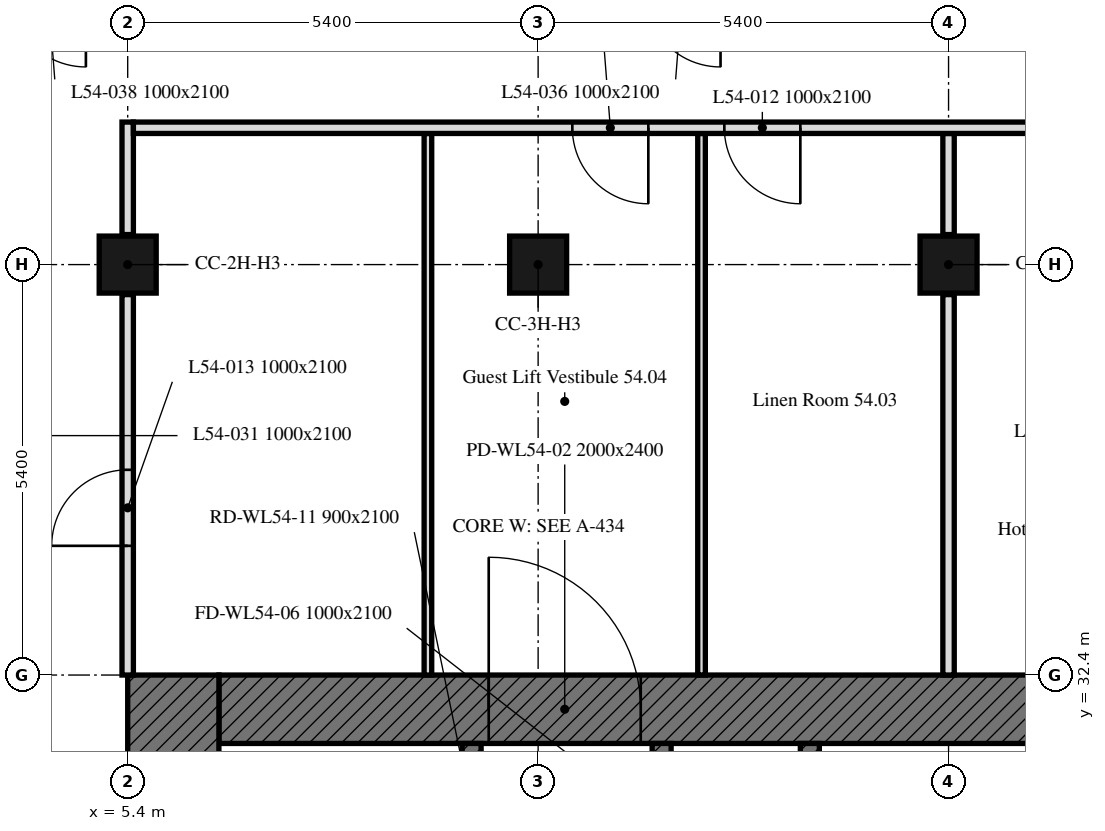
"""IFC4 building model, lengths in metres.
Left out: names, types, materials, properties, quantities, classifications, styles, units other than length and angle.
Written with IfcOpenShell. Run it as: python <this file> out.ifc"""

import sys

from ifc_helpers import new_model, si_unit, direction, frame, frame_2d, origin, origin_2d, place, context, subcontext, project, spatial, rectangle, extrude, element, fill, save


model = new_model("IFC4")
c1 = context("Model", 3, precision=1e-05, world=origin(), true_north=direction((0.0, 1.0)))
c2 = subcontext(c1, "Body", "Model", "MODEL_VIEW")
j1 = project(units=[si_unit("LENGTHUNIT", "METRE"), si_unit("PLANEANGLEUNIT", "RADIAN")], contexts=[c1])
p1 = place(None, origin())
s1 = spatial("IfcSite", under=j1, at=p1, CompositionType="ELEMENT")
p2 = place(p1, origin())
s2 = spatial("IfcBuilding", under=s1, at=p2, CompositionType="ELEMENT")
p3 = place(p2, frame((0.0, 0.0, 217.0)))
s3 = spatial("IfcBuildingStorey", under=s2, at=p3, CompositionType="ELEMENT", Elevation=217.0)
for number, where, z_axis, x_axis in (
    (1, (5.4, 37.8, 0.0), (0.0, 0.0, 1.0), (1.0, 0.0, 0.0)),
    (2, (10.8, 37.8, 0.0), (0.0, 0.0, 1.0), (1.0, 0.0, 0.0)),
    (3, (16.2, 37.8, 0.0), (0.0, 0.0, 1.0), (1.0, 0.0, 0.0)),
):
    element("IfcColumn", number, at=place(p3, frame(where, z_axis=z_axis, x_axis=x_axis)), inside=s3, PredefinedType="COLUMN", context=c2, shape_type="SweptSolid", body=[
        extrude(rectangle(XDim=0.75, YDim=0.75, at=origin_2d()), origin(), (0.0, 0.0, 1.0), 3.0),
    ])
p4 = place(p3, frame((6.6, 31.95, 0.0), z_axis=(0.0, 0.0, 1.0), x_axis=(1.0, 0.0, 0.0)))
e4 = element("IfcWall", 4, at=p4, inside=s3, PredefinedType="SOLIDWALL", context=c2, shape_type="SweptSolid", body=[
    extrude(rectangle(XDim=11.1, YDim=0.9, at=frame_2d((5.55, 0.0))), origin(), (0.0, 0.0, 1.0), 3.0),
])
p5 = place(p4, frame((3.55, 0.0, 0.0)))
e5 = element("IfcOpeningElement", 5, at=p5, cuts=e4, PredefinedType="OPENING", context=c2, shape_type="SweptSolid", body=[
    extrude(rectangle(XDim=2.0, YDim=2.4, at=frame_2d((1.0, 1.2))), frame((0.0, 0.45, 0.0), z_axis=(0.0, -1.0, 0.0), x_axis=(1.0, 0.0, 0.0)), (0.0, 0.0, 1.0), 0.9),
])
p6 = place(p3, frame((6.0, 16.2, 0.0), z_axis=(0.0, 0.0, 1.0), x_axis=(0.0, 1.0, 0.0)))
e6 = element("IfcWall", 6, at=p6, inside=s3, PredefinedType="SOLIDWALL", context=c2, shape_type="SweptSolid", body=[
    extrude(rectangle(XDim=16.2, YDim=1.2, at=frame_2d((8.1, 0.0))), origin(), (0.0, 0.0, 1.0), 3.0),
])
p7 = place(p3, frame((9.925, 17.1, 0.0), z_axis=(0.0, 0.0, 1.0), x_axis=(0.0, 1.0, 0.0)))
e7 = element("IfcWall", 7, at=p7, inside=s3, PredefinedType="SOLIDWALL", context=c2, shape_type="SweptSolid", body=[
    extrude(rectangle(XDim=14.4, YDim=0.25, at=frame_2d((7.2, 0.0))), origin(), (0.0, 0.0, 1.0), 3.0),
])
p8 = place(p7, frame((4.6, 0.0, 0.0)))
e8 = element("IfcOpeningElement", 8, at=p8, cuts=e7, PredefinedType="OPENING", context=c2, shape_type="SweptSolid", body=[
    extrude(rectangle(XDim=1.0, YDim=2.1, at=frame_2d((0.5, 1.05))), frame((0.0, 0.125, 0.0), z_axis=(0.0, -1.0, 0.0), x_axis=(1.0, 0.0, 0.0)), (0.0, 0.0, 1.0), 0.25),
])
p9 = place(p7, frame((7.062, 0.0, 0.0)))
e9 = element("IfcOpeningElement", 9, at=p9, cuts=e7, PredefinedType="OPENING", context=c2, shape_type="SweptSolid", body=[
    extrude(rectangle(XDim=1.2, YDim=2.1, at=frame_2d((0.6, 1.05))), frame((0.0, 0.125, 0.0), z_axis=(0.0, -1.0, 0.0), x_axis=(1.0, 0.0, 0.0)), (0.0, 0.0, 1.0), 0.25),
])
p10 = place(p7, frame((9.472, 0.0, 0.0)))
e10 = element("IfcOpeningElement", 10, at=p10, cuts=e7, PredefinedType="OPENING", context=c2, shape_type="SweptSolid", body=[
    extrude(rectangle(XDim=0.9, YDim=2.1, at=frame_2d((0.45, 1.05))), frame((0.0, 0.125, 0.0), z_axis=(0.0, -1.0, 0.0), x_axis=(1.0, 0.0, 0.0)), (0.0, 0.0, 1.0), 0.25),
])
p11 = place(p7, frame((11.159, 0.0, 0.0)))
e11 = element("IfcOpeningElement", 11, at=p11, cuts=e7, PredefinedType="OPENING", context=c2, shape_type="SweptSolid", body=[
    extrude(rectangle(XDim=0.9, YDim=2.1, at=frame_2d((0.45, 1.05))), frame((0.0, 0.125, 0.0), z_axis=(0.0, -1.0, 0.0), x_axis=(1.0, 0.0, 0.0)), (0.0, 0.0, 1.0), 0.25),
])
p12 = place(p7, frame((13.1, 0.0, 0.0)))
e12 = element("IfcOpeningElement", 12, at=p12, cuts=e7, PredefinedType="OPENING", context=c2, shape_type="SweptSolid", body=[
    extrude(rectangle(XDim=0.9, YDim=2.1, at=frame_2d((0.45, 1.05))), frame((0.0, 0.125, 0.0), z_axis=(0.0, -1.0, 0.0), x_axis=(1.0, 0.0, 0.0)), (0.0, 0.0, 1.0), 0.25),
])
p13 = place(p3, frame((14.375, 17.1, 0.0), z_axis=(0.0, 0.0, 1.0), x_axis=(0.0, 1.0, 0.0)))
e13 = element("IfcWall", 13, at=p13, inside=s3, PredefinedType="SOLIDWALL", context=c2, shape_type="SweptSolid", body=[
    extrude(rectangle(XDim=14.4, YDim=0.25, at=frame_2d((7.2, 0.0))), origin(), (0.0, 0.0, 1.0), 3.0),
])
p14 = place(p13, frame((13.15, 0.0, 0.0)))
e14 = element("IfcOpeningElement", 14, at=p14, cuts=e13, PredefinedType="OPENING", context=c2, shape_type="SweptSolid", body=[
    extrude(rectangle(XDim=1.0, YDim=2.1, at=frame_2d((0.5, 1.05))), frame((0.0, 0.125, 0.0), z_axis=(0.0, -1.0, 0.0), x_axis=(1.0, 0.0, 0.0)), (0.0, 0.0, 1.0), 0.25),
])
p15 = place(p13, frame((0.6, 0.0, 0.0)))
e15 = element("IfcOpeningElement", 15, at=p15, cuts=e13, PredefinedType="OPENING", context=c2, shape_type="SweptSolid", body=[
    extrude(rectangle(XDim=1.1, YDim=2.1, at=frame_2d((0.55, 1.05))), frame((0.0, 0.125, 0.0), z_axis=(0.0, -1.0, 0.0), x_axis=(1.0, 0.0, 0.0)), (0.0, 0.0, 1.0), 0.25),
])
p16 = place(p13, frame((3.25, 0.0, 0.0)))
e16 = element("IfcOpeningElement", 16, at=p16, cuts=e13, PredefinedType="OPENING", context=c2, shape_type="SweptSolid", body=[
    extrude(rectangle(XDim=0.9, YDim=2.1, at=frame_2d((0.45, 1.05))), frame((0.0, 0.125, 0.0), z_axis=(0.0, -1.0, 0.0), x_axis=(1.0, 0.0, 0.0)), (0.0, 0.0, 1.0), 0.25),
])
p17 = place(p3, frame((12.425, 29.4, 0.0), z_axis=(0.0, 0.0, 1.0), x_axis=(0.0, 1.0, 0.0)))
e17 = element("IfcWall", 17, at=p17, inside=s3, PredefinedType="SOLIDWALL", context=c2, shape_type="SweptSolid", body=[
    extrude(rectangle(XDim=2.1, YDim=0.25, at=frame_2d((1.05, 0.0))), origin(), (0.0, 0.0, 1.0), 3.0),
])
p18 = place(p17, frame((0.5, 0.0, 0.0)))
e18 = element("IfcOpeningElement", 18, at=p18, cuts=e17, PredefinedType="OPENING", context=c2, shape_type="SweptSolid", body=[
    extrude(rectangle(XDim=1.0, YDim=2.1, at=frame_2d((0.5, 1.05))), frame((0.0, 0.125, 0.0), z_axis=(0.0, -1.0, 0.0), x_axis=(1.0, 0.0, 0.0)), (0.0, 0.0, 1.0), 0.25),
])
p19 = place(p3, frame((16.2, 39.525, 0.0), z_axis=(0.0, 0.0, 1.0), x_axis=(0.0, -1.0, 0.0)))
e19 = element("IfcWall", 19, at=p19, inside=s3, PredefinedType="PARTITIONING", context=c2, shape_type="SweptSolid", body=[
    extrude(rectangle(XDim=1.33, YDim=0.15, at=frame_2d((0.665, 0.0))), origin(), (0.0, 0.0, 1.0), 2.4),
])
p20 = place(p3, frame((16.2, 37.405, 0.0), z_axis=(0.0, 0.0, 1.0), x_axis=(0.0, -1.0, 0.0)))
e20 = element("IfcWall", 20, at=p20, inside=s3, PredefinedType="PARTITIONING", context=c2, shape_type="SweptSolid", body=[
    extrude(rectangle(XDim=5.005, YDim=0.15, at=frame_2d((2.502, 0.0))), origin(), (0.0, 0.0, 1.0), 2.4),
])
for number, where, z_axis, x_axis in (
    (21, (12.95, 32.4, 0.0), (0.0, 0.0, 1.0), (0.0, 1.0, 0.0)),
    (22, (9.35, 39.525, 0.0), (0.0, 0.0, 1.0), (0.0, -1.0, 0.0)),
):
    element("IfcWall", number, at=place(p3, frame(where, z_axis=z_axis, x_axis=x_axis)), inside=s3, PredefinedType="PARTITIONING", context=c2, shape_type="SweptSolid", body=[
        extrude(rectangle(XDim=7.125, YDim=0.1, at=frame_2d((3.562, 0.0))), origin(), (0.0, 0.0, 1.0), 2.4),
    ])
p21 = place(p3, frame((5.4, 32.4, 0.0), z_axis=(0.0, 0.0, 1.0), x_axis=(0.0, 1.0, 0.0)))
e23 = element("IfcWall", 23, at=p21, inside=s3, PredefinedType="PARTITIONING", context=c2, shape_type="SweptSolid", body=[
    extrude(rectangle(XDim=5.005, YDim=0.15, at=frame_2d((2.502, 0.0))), origin(), (0.0, 0.0, 1.0), 3.0),
])
p22 = place(p21, frame((1.7, 0.0, 0.0)))
e24 = element("IfcOpeningElement", 24, at=p22, cuts=e23, PredefinedType="OPENING", context=c2, shape_type="SweptSolid", body=[
    extrude(rectangle(XDim=1.0, YDim=2.1, at=frame_2d((0.5, 1.05))), frame((0.0, 0.075, 0.0), z_axis=(0.0, -1.0, 0.0), x_axis=(1.0, 0.0, 0.0)), (0.0, 0.0, 1.0), 0.15),
])
p23 = place(p3, frame((5.4, 38.195, 0.0), z_axis=(0.0, 0.0, 1.0), x_axis=(0.0, 1.0, 0.0)))
e25 = element("IfcWall", 25, at=p23, inside=s3, PredefinedType="PARTITIONING", context=c2, shape_type="SweptSolid", body=[
    extrude(rectangle(XDim=1.48, YDim=0.15, at=frame_2d((0.74, 0.0))), origin(), (0.0, 0.0, 1.0), 3.0),
])
p24 = place(p3, frame((41.374, 39.6, 0.0), z_axis=(0.0, 0.0, 1.0), x_axis=(-1.0, 0.0, 0.0)))
e26 = element("IfcWall", 26, at=p24, inside=s3, PredefinedType="PARTITIONING", context=c2, shape_type="SweptSolid", body=[
    extrude(rectangle(XDim=35.899, YDim=0.15, at=frame_2d((17.949, 0.0))), origin(), (0.0, 0.0, 1.0), 2.4),
])
p25 = place(p24, frame((0.25, 0.0, 0.0)))
e27 = element("IfcOpeningElement", 27, at=p25, cuts=e26, PredefinedType="OPENING", context=c2, shape_type="SweptSolid", body=[
    extrude(rectangle(XDim=1.0, YDim=2.1, at=frame_2d((0.5, 1.05))), frame((0.0, 0.075, 0.0), z_axis=(0.0, -1.0, 0.0), x_axis=(1.0, 0.0, 0.0)), (0.0, 0.0, 1.0), 0.15),
])
p26 = place(p24, frame((27.124, 0.0, 0.0)))
e28 = element("IfcOpeningElement", 28, at=p26, cuts=e26, PredefinedType="OPENING", context=c2, shape_type="SweptSolid", body=[
    extrude(rectangle(XDim=1.0, YDim=2.1, at=frame_2d((0.5, 1.05))), frame((0.0, 0.075, 0.0), z_axis=(0.0, -1.0, 0.0), x_axis=(1.0, 0.0, 0.0)), (0.0, 0.0, 1.0), 0.15),
])
p27 = place(p24, frame((6.024, 0.0, 0.0)))
e29 = element("IfcOpeningElement", 29, at=p27, cuts=e26, PredefinedType="OPENING", context=c2, shape_type="SweptSolid", body=[
    extrude(rectangle(XDim=1.0, YDim=2.1, at=frame_2d((0.5, 1.05))), frame((0.0, 0.075, 0.0), z_axis=(0.0, -1.0, 0.0), x_axis=(1.0, 0.0, 0.0)), (0.0, 0.0, 1.0), 0.15),
])
p28 = place(p24, frame((11.974, 0.0, 0.0)))
e30 = element("IfcOpeningElement", 30, at=p28, cuts=e26, PredefinedType="OPENING", context=c2, shape_type="SweptSolid", body=[
    extrude(rectangle(XDim=1.0, YDim=2.1, at=frame_2d((0.5, 1.05))), frame((0.0, 0.075, 0.0), z_axis=(0.0, -1.0, 0.0), x_axis=(1.0, 0.0, 0.0)), (0.0, 0.0, 1.0), 0.15),
])
p29 = place(p24, frame((15.774, 0.0, 0.0)))
e31 = element("IfcOpeningElement", 31, at=p29, cuts=e26, PredefinedType="OPENING", context=c2, shape_type="SweptSolid", body=[
    extrude(rectangle(XDim=1.0, YDim=2.1, at=frame_2d((0.5, 1.05))), frame((0.0, 0.075, 0.0), z_axis=(0.0, -1.0, 0.0), x_axis=(1.0, 0.0, 0.0)), (0.0, 0.0, 1.0), 0.15),
])
p30 = place(p24, frame((22.774, 0.0, 0.0)))
e32 = element("IfcOpeningElement", 32, at=p30, cuts=e26, PredefinedType="OPENING", context=c2, shape_type="SweptSolid", body=[
    extrude(rectangle(XDim=1.0, YDim=2.1, at=frame_2d((0.5, 1.05))), frame((0.0, 0.075, 0.0), z_axis=(0.0, -1.0, 0.0), x_axis=(1.0, 0.0, 0.0)), (0.0, 0.0, 1.0), 0.15),
])
p31 = place(p24, frame((3.754, 0.0, 0.0)))
e33 = element("IfcOpeningElement", 33, at=p31, cuts=e26, PredefinedType="OPENING", context=c2, shape_type="SweptSolid", body=[
    extrude(rectangle(XDim=1.8, YDim=2.4, at=frame_2d((0.9, 1.2))), frame((0.0, 0.075, 0.0), z_axis=(0.0, -1.0, 0.0), x_axis=(1.0, 0.0, 0.0)), (0.0, 0.0, 1.0), 0.15),
])
p32 = place(p24, frame((29.124, 0.0, 0.0)))
e34 = element("IfcOpeningElement", 34, at=p32, cuts=e26, PredefinedType="OPENING", context=c2, shape_type="SweptSolid", body=[
    extrude(rectangle(XDim=1.0, YDim=2.1, at=frame_2d((0.5, 1.05))), frame((0.0, 0.075, 0.0), z_axis=(0.0, -1.0, 0.0), x_axis=(1.0, 0.0, 0.0)), (0.0, 0.0, 1.0), 0.15),
])
p33 = place(p5, origin())
e35 = element("IfcDoor", 35, at=p33, inside=s3, OperationType="DOUBLE_DOOR_SINGLE_SWING", PredefinedType="DOOR", context=c2, shape_type="SweptSolid", body=[
    extrude(rectangle(XDim=2.0, YDim=2.4, at=frame_2d((1.0, 1.2))), frame((0.0, 0.025, 0.0), z_axis=(0.0, -1.0, 0.0), x_axis=(1.0, 0.0, 0.0)), (0.0, 0.0, 1.0), 0.05),
])
fill(e5, e35)
p34 = place(p26, origin())
e36 = element("IfcDoor", 36, at=p34, inside=s3, OperationType="SINGLE_SWING_LEFT", PredefinedType="DOOR", context=c2, shape_type="SweptSolid", body=[
    extrude(rectangle(XDim=1.0, YDim=2.1, at=frame_2d((0.5, 1.05))), frame((0.0, 0.025, 0.0), z_axis=(0.0, -1.0, 0.0), x_axis=(1.0, 0.0, 0.0)), (0.0, 0.0, 1.0), 0.05),
])
fill(e28, e36)
p35 = place(p22, origin())
e37 = element("IfcDoor", 37, at=p35, inside=s3, OperationType="SINGLE_SWING_RIGHT", PredefinedType="DOOR", context=c2, shape_type="SweptSolid", body=[
    extrude(rectangle(XDim=1.0, YDim=2.1, at=frame_2d((0.5, 1.05))), frame((0.0, 0.025, 0.0), z_axis=(0.0, -1.0, 0.0), x_axis=(1.0, 0.0, 0.0)), (0.0, 0.0, 1.0), 0.05),
])
fill(e24, e37)
p36 = place(p32, origin())
e38 = element("IfcDoor", 38, at=p36, inside=s3, OperationType="SINGLE_SWING_RIGHT", PredefinedType="DOOR", context=c2, shape_type="SweptSolid", body=[
    extrude(rectangle(XDim=1.0, YDim=2.1, at=frame_2d((0.5, 1.05))), frame((0.0, 0.025, 0.0), z_axis=(0.0, -1.0, 0.0), x_axis=(1.0, 0.0, 0.0)), (0.0, 0.0, 1.0), 0.05),
])
fill(e34, e38)
save(model, sys.argv[1])
